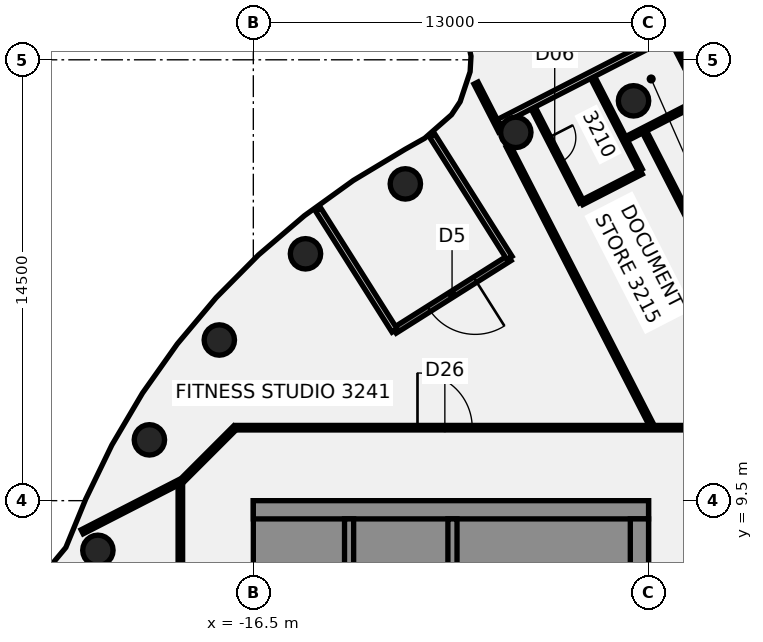
"""IFC4 building model, lengths in metres.
Left out: names, types, materials, properties, quantities, classifications, styles, units other than length and angle.
Written with IfcOpenShell. Run it as: python <this file> out.ifc"""

import sys

from ifc_helpers import new_model, si_unit, direction, frame, frame_2d, origin, origin_2d, place, context, subcontext, project, spatial, polyline, rectangle, circle, outline, extrude, element, fill, save


model = new_model("IFC4")
c1 = context("Model", 3, precision=1e-05, world=origin(), true_north=direction((0.0, 1.0)))
c2 = subcontext(c1, "Body", "Model", "MODEL_VIEW")
j1 = project(units=[si_unit("LENGTHUNIT", "METRE"), si_unit("PLANEANGLEUNIT", "RADIAN")], contexts=[c1])
p1 = place(None, origin())
s1 = spatial("IfcSite", under=j1, at=p1, CompositionType="ELEMENT")
p2 = place(p1, origin())
s2 = spatial("IfcBuilding", under=s1, at=p2, CompositionType="ELEMENT")
p3 = place(p2, frame((0.0, 0.0, 133.0)))
s3 = spatial("IfcBuildingStorey", under=s2, at=p3, CompositionType="ELEMENT", Elevation=133.0)
for number, where, z_axis, x_axis in (
    (1, (-3.994, 22.651, -0.14), (0.0, 0.0, 1.0), (1.0, 0.0, 0.0)),
    (2, (-7.866, 21.613, -0.14), (0.0, 0.0, 1.0), (1.0, 0.0, 0.0)),
    (3, (-11.5, 19.919, -0.14), (0.0, 0.0, 1.0), (1.0, 0.0, 0.0)),
    (4, (-14.784, 17.619, -0.14), (0.0, 0.0, 1.0), (1.0, 0.0, 0.0)),
    (5, (-17.619, 14.784, -0.14), (0.0, 0.0, 1.0), (1.0, 0.0, 0.0)),
    (6, (-19.919, 11.5, -0.14), (0.0, 0.0, 1.0), (1.0, 0.0, 0.0)),
    (7, (-21.613, 7.866, -0.14), (0.0, 0.0, 1.0), (1.0, 0.0, 0.0)),
):
    element("IfcColumn", number, at=place(p3, frame(where, z_axis=z_axis, x_axis=x_axis)), inside=s3, PredefinedType="COLUMN", context=c2, shape_type="SweptSolid", body=[
        extrude(circle(Radius=0.5, at=origin_2d()), origin(), (0.0, 0.0, 1.0), 3.75),
    ])
p4 = place(p3, frame((-9.176, 23.235, 0.0), z_axis=(0.0, 0.0, 1.0), x_axis=(0.456484124578, -0.889731557273, 0.0)))
e8 = element("IfcWall", 8, at=p4, inside=s3, PredefinedType="PARTITIONING", context=c2, shape_type="SweptSolid", body=[
    extrude(rectangle(XDim=1.776, YDim=0.15, at=frame_2d((0.888, 0.0))), origin(), (0.0, 0.0, 1.0), 3.01),
])
p5 = place(p3, frame((-8.116, 21.17, 0.0), z_axis=(0.0, 0.0, 1.0), x_axis=(0.456543941527, -0.889700865154, 0.0)))
e9 = element("IfcWall", 9, at=p5, inside=s3, PredefinedType="PARTITIONING", context=c2, shape_type="SweptSolid", body=[
    extrude(rectangle(XDim=10.314, YDim=0.15, at=frame_2d((5.157, 0.0))), origin(), (0.0, 0.0, 1.0), 3.01),
])
p6 = place(p3, frame((-8.932, 36.777, 0.0), z_axis=(0.0, 0.0, 1.0), x_axis=(0.456530071129, -0.889707982517, 0.0)))
e10 = element("IfcWall", 10, at=p6, inside=s3, PredefinedType="PARTITIONING", context=c2, shape_type="SweptSolid", body=[
    extrude(rectangle(XDim=15.745, YDim=0.15, at=frame_2d((7.873, 0.0))), origin(), (0.0, 0.0, 1.0), 3.01),
])
p7 = place(p6, frame((14.175, 0.0, 0.0)))
e11 = element("IfcOpeningElement", 11, at=p7, cuts=e10, PredefinedType="OPENING", context=c2, shape_type="SweptSolid", body=[
    extrude(rectangle(XDim=1.0, YDim=2.1, at=frame_2d((0.5, 1.05))), frame((0.0, 0.085, 0.0), z_axis=(0.0, -1.0, 0.0), x_axis=(1.0, 0.0, 0.0)), (0.0, 0.0, 1.0), 0.17),
])
p8 = place(p6, frame((4.425, 0.0, 0.0)))
e12 = element("IfcOpeningElement", 12, at=p8, cuts=e10, PredefinedType="OPENING", context=c2, shape_type="SweptSolid", body=[
    extrude(rectangle(XDim=0.9, YDim=2.1, at=frame_2d((0.45, 1.05))), frame((0.0, 0.085, 0.0), z_axis=(0.0, -1.0, 0.0), x_axis=(1.0, 0.0, 0.0)), (0.0, 0.0, 1.0), 0.17),
])
p9 = place(p3, frame((-7.294, 22.416, 0.0), z_axis=(0.0, 0.0, 1.0), x_axis=(0.456617130673, -0.889663304838, 0.0)))
e13 = element("IfcWall", 13, at=p9, inside=s3, PredefinedType="PARTITIONING", context=c2, shape_type="SweptSolid", body=[
    extrude(rectangle(XDim=3.48, YDim=0.15, at=frame_2d((1.74, 0.0))), origin(), (0.0, 0.0, 1.0), 3.01),
])
p10 = place(p9, frame((1.1, 0.0, 0.0)))
e14 = element("IfcOpeningElement", 14, at=p10, cuts=e13, PredefinedType="OPENING", context=c2, shape_type="SweptSolid", body=[
    extrude(rectangle(XDim=0.9, YDim=2.1, at=frame_2d((0.45, 1.05))), frame((0.0, 0.085, 0.0), z_axis=(0.0, -1.0, 0.0), x_axis=(1.0, 0.0, 0.0)), (0.0, 0.0, 1.0), 0.17),
])
p11 = place(p3, frame((-5.337, 23.42, 0.0), z_axis=(0.0, 0.0, 1.0), x_axis=(0.456682724055, -0.889629636169, 0.0)))
e15 = element("IfcWall", 15, at=p11, inside=s3, PredefinedType="PARTITIONING", context=c2, shape_type="SweptSolid", body=[
    extrude(rectangle(XDim=3.425, YDim=0.15, at=frame_2d((1.712, 0.0))), origin(), (0.0, 0.0, 1.0), 3.01),
])
p12 = place(p3, frame((-3.63, 21.627, 0.0), z_axis=(0.0, 0.0, 1.0), x_axis=(0.456496994871, -0.889724953946, 0.0)))
e16 = element("IfcWall", 16, at=p12, inside=s3, PredefinedType="PARTITIONING", context=c2, shape_type="SweptSolid", body=[
    extrude(rectangle(XDim=10.828, YDim=0.15, at=frame_2d((5.414, 0.0))), origin(), (0.0, 0.0, 1.0), 3.01),
])
p13 = place(p12, frame((6.525, 0.0, 0.0)))
e17 = element("IfcOpeningElement", 17, at=p13, cuts=e16, PredefinedType="OPENING", context=c2, shape_type="SweptSolid", body=[
    extrude(rectangle(XDim=0.9, YDim=2.1, at=frame_2d((0.45, 1.05))), frame((0.0, 0.085, 0.0), z_axis=(0.0, -1.0, 0.0), x_axis=(1.0, 0.0, 0.0)), (0.0, 0.0, 1.0), 0.17),
])
p14 = place(p3, frame((-17.065, 11.9, 0.0), z_axis=(0.0, 0.0, 1.0), x_axis=(1.0, 0.0, 0.0)))
e18 = element("IfcWall", 18, at=p14, inside=s3, PredefinedType="PARTITIONING", context=c2, shape_type="SweptSolid", body=[
    extrude(rectangle(XDim=34.165, YDim=0.15, at=frame_2d((17.083, 0.0))), origin(), (0.0, 0.0, 1.0), 3.01),
])
p15 = place(p14, frame((21.276, 0.0, 0.0)))
e19 = element("IfcOpeningElement", 19, at=p15, cuts=e18, PredefinedType="OPENING", context=c2, shape_type="SweptSolid", body=[
    extrude(rectangle(XDim=1.8, YDim=2.1, at=frame_2d((0.9, 1.05))), frame((0.0, 0.085, 0.0), z_axis=(0.0, -1.0, 0.0), x_axis=(1.0, 0.0, 0.0)), (0.0, 0.0, 1.0), 0.17),
])
p16 = place(p14, frame((30.297, 0.0, 0.0)))
e20 = element("IfcOpeningElement", 20, at=p16, cuts=e18, PredefinedType="OPENING", context=c2, shape_type="SweptSolid", body=[
    extrude(rectangle(XDim=1.8, YDim=2.1, at=frame_2d((0.9, 1.05))), frame((0.0, 0.085, 0.0), z_axis=(0.0, -1.0, 0.0), x_axis=(1.0, 0.0, 0.0)), (0.0, 0.0, 1.0), 0.17),
])
p17 = place(p14, frame((5.965, 0.0, 0.0)))
e21 = element("IfcOpeningElement", 21, at=p17, cuts=e18, PredefinedType="OPENING", context=c2, shape_type="SweptSolid", body=[
    extrude(rectangle(XDim=1.8, YDim=2.1, at=frame_2d((0.9, 1.05))), frame((0.0, 0.085, 0.0), z_axis=(0.0, -1.0, 0.0), x_axis=(1.0, 0.0, 0.0)), (0.0, 0.0, 1.0), 0.17),
])
p18 = place(p3, frame((-22.13, 8.476, 0.0), z_axis=(0.0, 0.0, 1.0), x_axis=(0.889666890189, 0.456610144984, 0.0)))
e22 = element("IfcWall", 22, at=p18, inside=s3, PredefinedType="PARTITIONING", context=c2, shape_type="SweptSolid", body=[
    extrude(rectangle(XDim=3.597, YDim=0.15, at=frame_2d((1.798, 0.0))), origin(), (0.0, 0.0, 1.0), 3.01),
])
p19 = place(p3, frame((-8.426, 21.948, 0.0), z_axis=(0.0, 0.0, 1.0), x_axis=(0.889606613969, 0.456727569108, 0.0)))
e23 = element("IfcWall", 23, at=p19, inside=s3, PredefinedType="PARTITIONING", context=c2, shape_type="SweptSolid", body=[
    extrude(rectangle(XDim=14.219, YDim=0.2, at=frame_2d((7.11, 0.0))), origin(), (0.0, 0.0, 1.0), 3.01),
])
p20 = place(p19, frame((6.62, 0.0, 0.0)))
e24 = element("IfcOpeningElement", 24, at=p20, cuts=e23, PredefinedType="OPENING", context=c2, shape_type="SweptSolid", body=[
    extrude(rectangle(XDim=1.4, YDim=2.1, at=frame_2d((0.7, 1.05))), frame((0.0, 0.11, 0.0), z_axis=(0.0, -1.0, 0.0), x_axis=(1.0, 0.0, 0.0)), (0.0, 0.0, 1.0), 0.22),
])
p21 = place(p3, frame((-5.696, 19.302, 0.0), z_axis=(0.0, 0.0, 1.0), x_axis=(0.889761986003, 0.456424811183, 0.0)))
e25 = element("IfcWall", 25, at=p21, inside=s3, PredefinedType="PARTITIONING", context=c2, shape_type="SweptSolid", body=[
    extrude(rectangle(XDim=2.199, YDim=0.15, at=frame_2d((1.1, 0.0))), origin(), (0.0, 0.0, 1.0), 3.01),
])
p22 = place(p3, frame((-4.22, 21.408, 0.0), z_axis=(0.0, 0.0, 1.0), x_axis=(0.889499615921, 0.456935918128, 0.0)))
e26 = element("IfcWall", 26, at=p22, inside=s3, PredefinedType="PARTITIONING", context=c2, shape_type="SweptSolid", body=[
    extrude(rectangle(XDim=2.825, YDim=0.15, at=frame_2d((1.413, 0.0))), origin(), (0.0, 0.0, 1.0), 3.01),
])
p23 = place(p3, frame((-18.872, 10.128, 0.0), z_axis=(0.0, 0.0, 1.0), x_axis=(0.707106781187, 0.707106781187, 0.0)))
e27 = element("IfcWall", 27, at=p23, inside=s3, PredefinedType="PARTITIONING", context=c2, shape_type="SweptSolid", body=[
    extrude(rectangle(XDim=2.505, YDim=0.15, at=frame_2d((1.253, 0.0))), origin(), (0.0, 0.0, 1.0), 3.01),
])
p24 = place(p3, frame((-18.9, -10.1, 0.0), z_axis=(0.0, 0.0, 1.0), x_axis=(0.0, 1.0, 0.0)))
e28 = element("IfcWall", 28, at=p24, inside=s3, PredefinedType="PARTITIONING", context=c2, shape_type="SweptSolid", body=[
    extrude(rectangle(XDim=20.2, YDim=0.15, at=frame_2d((10.1, 0.0))), origin(), (0.0, 0.0, 1.0), 3.01),
])
p25 = place(p24, frame((11.619, 0.0, 0.0)))
e29 = element("IfcOpeningElement", 29, at=p25, cuts=e28, PredefinedType="OPENING", context=c2, shape_type="SweptSolid", body=[
    extrude(rectangle(XDim=1.8, YDim=2.1, at=frame_2d((0.9, 1.05))), frame((0.0, 0.085, 0.0), z_axis=(0.0, -1.0, 0.0), x_axis=(1.0, 0.0, 0.0)), (0.0, 0.0, 1.0), 0.17),
])
p26 = place(p24, frame((4.499, 0.0, 0.0)))
e30 = element("IfcOpeningElement", 30, at=p26, cuts=e28, PredefinedType="OPENING", context=c2, shape_type="SweptSolid", body=[
    extrude(rectangle(XDim=0.9, YDim=2.1, at=frame_2d((0.45, 1.05))), frame((0.0, 0.085, 0.0), z_axis=(0.0, -1.0, 0.0), x_axis=(1.0, 0.0, 0.0)), (0.0, 0.0, 1.0), 0.17),
])
p27 = place(p3, frame((-8.073, 17.482, 0.0), z_axis=(0.0, 0.0, 1.0), x_axis=(-0.845417528595, -0.534105984187, 0.0)))
e31 = element("IfcWall", 31, at=p27, inside=s3, PredefinedType="SOLIDWALL", context=c2, shape_type="SweptSolid", body=[
    extrude(rectangle(XDim=4.471, YDim=0.2, at=frame_2d((2.235, 0.0))), origin(), (0.0, 0.0, 1.0), 3.61),
])
p28 = place(p27, frame((1.335, 0.0, 0.0)))
e32 = element("IfcOpeningElement", 32, at=p28, cuts=e31, PredefinedType="OPENING", context=c2, shape_type="SweptSolid", body=[
    extrude(rectangle(XDim=1.8, YDim=2.4, at=frame_2d((0.9, 1.2))), frame((0.0, 0.11, 0.0), z_axis=(0.0, -1.0, 0.0), x_axis=(1.0, 0.0, 0.0)), (0.0, 0.0, 1.0), 0.22),
])
p29 = place(p3, frame((-8.073, 17.482, 0.0), z_axis=(0.0, 0.0, 1.0), x_axis=(-0.534101065581, 0.845420635982, 0.0)))
e33 = element("IfcWall", 33, at=p29, inside=s3, PredefinedType="SOLIDWALL", context=c2, shape_type="SweptSolid", body=[
    extrude(rectangle(XDim=4.759, YDim=0.2, at=frame_2d((2.38, 0.0))), origin(), (0.0, 0.0, 1.0), 3.61),
])
p30 = place(p3, frame((-11.853, 15.094, 0.0), z_axis=(0.0, 0.0, 1.0), x_axis=(-0.534084671669, 0.845430992742, 0.0)))
e34 = element("IfcWall", 34, at=p30, inside=s3, PredefinedType="SOLIDWALL", context=c2, shape_type="SweptSolid", body=[
    extrude(rectangle(XDim=4.709, YDim=0.2, at=frame_2d((2.354, 0.0))), origin(), (0.0, 0.0, 1.0), 3.61),
])
p31 = place(p3, origin())
e35 = element("IfcWall", 35, at=p31, inside=s3, PredefinedType="SHEAR", context=c2, shape_type="SweptSolid", body=[
    extrude(outline(polyline([(-13.5, -8.9), (-13.5, -8.125), (-15.9, -8.125), (-15.9, -5.625), (-13.5, -5.625), (-13.5, -5.375), (-15.9, -5.375), (-15.9, -2.875), (-13.5, -2.875), (-13.5, -2.625), (-15.9, -2.625), (-15.9, -0.125), (-13.5, -0.125), (-13.5, 0.125), (-15.9, 0.125), (-15.9, 2.625), (-13.5, 2.625), (-13.5, 2.875), (-15.9, 2.875), (-15.9, 5.375), (-13.5, 5.375), (-13.5, 5.625), (-15.9, 5.625), (-15.9, 8.125), (-13.5, 8.125), (-13.5, 8.9), (-15.9, 8.9), (-16.5, 8.9), (-16.5, -8.9), (-15.9, -8.9), (-13.5, -8.9)])), origin(), (0.0, 0.0, 1.0), 3.61),
])
p32 = place(p3, frame((-16.5, 9.2, 0.0), z_axis=(0.0, 0.0, 1.0), x_axis=(1.0, 0.0, 0.0)))
e36 = element("IfcWall", 36, at=p32, inside=s3, PredefinedType="SHEAR", context=c2, shape_type="SweptSolid", body=[
    extrude(rectangle(XDim=13.0, YDim=0.6, at=frame_2d((6.5, 0.0))), origin(), (0.0, 0.0, 1.0), 3.61),
])
p33 = place(p3, origin())
e37 = element("IfcWall", 37, at=p33, inside=s3, PredefinedType="SHEAR", context=c2, shape_type="SweptSolid", body=[
    extrude(outline(polyline([(-9.8, -5.375), (-9.8, -5.625), (-7.5, -5.625), (-7.2, -5.625), (-7.2, 8.9), (-7.5, 8.9), (-9.8, 8.9), (-9.8, 8.125), (-7.5, 8.125), (-7.5, 5.625), (-9.8, 5.625), (-9.8, 5.375), (-7.5, 5.375), (-7.5, 2.875), (-9.8, 2.875), (-9.8, 2.625), (-7.5, 2.625), (-7.5, 0.125), (-9.8, 0.125), (-9.8, -0.125), (-7.5, -0.125), (-7.5, -2.625), (-9.8, -2.625), (-9.8, -2.875), (-7.5, -2.875), (-7.5, -5.375), (-9.8, -5.375)])), origin(), (0.0, 0.0, 1.0), 3.61),
])
p34 = place(p3, frame((-13.35, -8.9, 0.0), z_axis=(0.0, 0.0, 1.0), x_axis=(0.0, 1.0, 0.0)))
e38 = element("IfcWall", 38, at=p34, inside=s3, PredefinedType="SHEAR", context=c2, shape_type="SweptSolid", body=[
    extrude(rectangle(XDim=17.8, YDim=0.3, at=frame_2d((8.9, 0.0))), origin(), (0.0, 0.0, 1.0), 3.61),
])
p35 = place(p34, frame((1.325, 0.0, 0.0)))
e39 = element("IfcOpeningElement", 39, at=p35, cuts=e38, PredefinedType="OPENING", context=c2, shape_type="SweptSolid", body=[
    extrude(rectangle(XDim=1.4, YDim=2.1, at=frame_2d((0.7, 1.05))), frame((0.0, 0.16, 0.0), z_axis=(0.0, -1.0, 0.0), x_axis=(1.0, 0.0, 0.0)), (0.0, 0.0, 1.0), 0.32),
])
p36 = place(p3, frame((-9.95, -8.9, 0.0), z_axis=(0.0, 0.0, 1.0), x_axis=(0.0, 1.0, 0.0)))
e40 = element("IfcWall", 40, at=p36, inside=s3, PredefinedType="SHEAR", context=c2, shape_type="SweptSolid", body=[
    extrude(rectangle(XDim=17.8, YDim=0.3, at=frame_2d((8.9, 0.0))), origin(), (0.0, 0.0, 1.0), 3.61),
])
p37 = place(p36, frame((4.175, 0.0, 0.0)))
e41 = element("IfcOpeningElement", 41, at=p37, cuts=e40, PredefinedType="OPENING", context=c2, shape_type="SweptSolid", body=[
    extrude(rectangle(XDim=1.2, YDim=2.1, at=frame_2d((0.6, 1.05))), frame((0.0, 0.16, 0.0), z_axis=(0.0, -1.0, 0.0), x_axis=(1.0, 0.0, 0.0)), (0.0, 0.0, 1.0), 0.32),
])
p38 = place(p36, frame((6.925, 0.0, 0.0)))
e42 = element("IfcOpeningElement", 42, at=p38, cuts=e40, PredefinedType="OPENING", context=c2, shape_type="SweptSolid", body=[
    extrude(rectangle(XDim=1.2, YDim=2.1, at=frame_2d((0.6, 1.05))), frame((0.0, 0.16, 0.0), z_axis=(0.0, -1.0, 0.0), x_axis=(1.0, 0.0, 0.0)), (0.0, 0.0, 1.0), 0.32),
])
p39 = place(p3, frame((-3.8, -8.9, 0.0), z_axis=(0.0, 0.0, 1.0), x_axis=(0.0, 1.0, 0.0)))
e43 = element("IfcWall", 43, at=p39, inside=s3, PredefinedType="SHEAR", context=c2, shape_type="SweptSolid", body=[
    extrude(rectangle(XDim=17.8, YDim=0.6, at=frame_2d((8.9, 0.0))), origin(), (0.0, 0.0, 1.0), 3.61),
])
p40 = place(p39, frame((1.25, 0.0, 0.0)))
e44 = element("IfcOpeningElement", 44, at=p40, cuts=e43, PredefinedType="OPENING", context=c2, shape_type="SweptSolid", body=[
    extrude(rectangle(XDim=1.8, YDim=2.1, at=frame_2d((0.9, 1.05))), frame((0.0, 0.31, 0.0), z_axis=(0.0, -1.0, 0.0), x_axis=(1.0, 0.0, 0.0)), (0.0, 0.0, 1.0), 0.62),
])
p41 = place(p39, frame((13.8, 0.0, 0.0)))
e45 = element("IfcOpeningElement", 45, at=p41, cuts=e43, PredefinedType="OPENING", context=c2, shape_type="SweptSolid", body=[
    extrude(rectangle(XDim=1.0, YDim=2.1, at=frame_2d((0.5, 1.05))), frame((0.0, 0.31, 0.0), z_axis=(0.0, -1.0, 0.0), x_axis=(1.0, 0.0, 0.0)), (0.0, 0.0, 1.0), 0.62),
])
p42 = place(p7, frame((1.0, 0.0, 0.0), z_axis=(0.0, 0.0, 1.0), x_axis=(-1.0, 0.0, 0.0)))
e46 = element("IfcDoor", 46, at=p42, inside=s3, OperationType="SINGLE_SWING_RIGHT", PredefinedType="DOOR", context=c2, shape_type="SweptSolid", body=[
    extrude(rectangle(XDim=1.0, YDim=2.1, at=frame_2d((0.5, 1.05))), frame((0.0, 0.025, 0.0), z_axis=(0.0, -1.0, 0.0), x_axis=(1.0, 0.0, 0.0)), (0.0, 0.0, 1.0), 0.05),
])
fill(e11, e46)
p43 = place(p10, origin())
e47 = element("IfcDoor", 47, at=p43, inside=s3, OperationType="SINGLE_SWING_RIGHT", PredefinedType="DOOR", context=c2, shape_type="SweptSolid", body=[
    extrude(rectangle(XDim=0.9, YDim=2.1, at=frame_2d((0.45, 1.05))), frame((0.0, 0.025, 0.0), z_axis=(0.0, -1.0, 0.0), x_axis=(1.0, 0.0, 0.0)), (0.0, 0.0, 1.0), 0.05),
])
fill(e14, e47)
p44 = place(p17, origin())
e48 = element("IfcDoor", 48, at=p44, inside=s3, OperationType="DOUBLE_DOOR_SINGLE_SWING", PredefinedType="DOOR", context=c2, shape_type="SweptSolid", body=[
    extrude(rectangle(XDim=1.8, YDim=2.1, at=frame_2d((0.9, 1.05))), frame((0.0, 0.025, 0.0), z_axis=(0.0, -1.0, 0.0), x_axis=(1.0, 0.0, 0.0)), (0.0, 0.0, 1.0), 0.05),
])
fill(e21, e48)
p45 = place(p28, origin())
e49 = element("IfcDoor", 49, at=p45, inside=s3, OperationType="SINGLE_SWING_LEFT", PredefinedType="DOOR", context=c2, shape_type="SweptSolid", body=[
    extrude(rectangle(XDim=1.8, YDim=2.4, at=frame_2d((0.9, 1.2))), frame((0.0, 0.025, 0.0), z_axis=(0.0, -1.0, 0.0), x_axis=(1.0, 0.0, 0.0)), (0.0, 0.0, 1.0), 0.05),
])
fill(e32, e49)
save(model, sys.argv[1])
